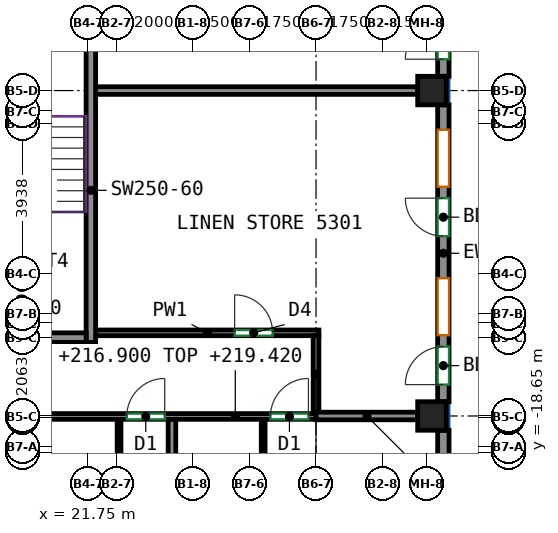
"""IFC4 building model, lengths in metres.
Left out: names, types, materials, properties, quantities, classifications, styles, units other than length and angle.
Written with IfcOpenShell. Run it as: python <this file> out.ifc"""

import sys

from ifc_helpers import new_model, si_unit, direction, frame, frame_2d, origin, origin_2d, place, context, subcontext, project, spatial, rectangle, extrude, source, transform, mapped, element, fill, save


model = new_model("IFC4")
c1 = context("Model", 3, precision=1e-05, world=origin(), true_north=direction((0.0, 1.0)))
c2 = subcontext(c1, "Body", "Model", "MODEL_VIEW")
j1 = project(units=[si_unit("LENGTHUNIT", "METRE"), si_unit("PLANEANGLEUNIT", "RADIAN")], contexts=[c1])
p1 = place(None, origin())
s1 = spatial("IfcSite", under=j1, at=p1, CompositionType="ELEMENT")
p2 = place(p1, origin())
s2 = spatial("IfcBuilding", under=s1, at=p2, CompositionType="ELEMENT")
p3 = place(p2, frame((0.0, 0.0, 216.9)))
s3 = spatial("IfcBuildingStorey", under=s2, at=p3, CompositionType="ELEMENT", Elevation=216.9)
m1 = source(origin(), c2, "Body", "SweptSolid", [
    extrude(rectangle(XDim=0.75, YDim=0.75, at=origin_2d()), origin(), (0.0, 0.0, 1.0), 3.12),
])
for number, where, z_axis, x_axis in (
    (1, (30.8, -17.688, 0.0), (0.0, 0.0, 1.0), (1.0, 0.0, 0.0)),
    (2, (30.8, -9.125, 0.0), (0.0, 0.0, 1.0), (1.0, 0.0, 0.0)),
):
    element("IfcColumn", number, at=place(p3, frame(where, z_axis=z_axis, x_axis=x_axis)), inside=s3, PredefinedType="COLUMN", context=c2, shape_type="MappedRepresentation", body=[
        mapped(m1, transform((0.0, 0.0, 0.0))),
    ])
m2 = source(origin(), c2, "Body", "SweptSolid", [
    extrude(rectangle(XDim=8.0, YDim=0.25, at=frame_2d((4.0, 0.0))), origin(), (0.0, 0.0, 1.0), 3.12),
])
p4 = place(p3, frame((21.825, -15.75, 0.0), z_axis=(0.0, 0.0, 1.0), x_axis=(0.0, 1.0, 0.0)))
e3 = element("IfcWall", 3, at=p4, inside=s3, PredefinedType="SHEAR", context=c2, shape_type="MappedRepresentation", body=[
    mapped(m2, transform((0.0, 0.0, 0.0))),
])
m3 = source(origin(), c2, "Body", "SweptSolid", [
    extrude(rectangle(XDim=3.7, YDim=0.25, at=frame_2d((1.85, 0.0))), origin(), (0.0, 0.0, 1.0), 3.12),
])
p5 = place(p3, frame((18.0, -15.625, 0.0), z_axis=(0.0, 0.0, 1.0), x_axis=(1.0, 0.0, 0.0)))
e4 = element("IfcWall", 4, at=p5, inside=s3, PredefinedType="SHEAR", context=c2, shape_type="MappedRepresentation", body=[
    mapped(m3, transform((0.0, 0.0, 0.0))),
])
m4 = source(origin(), c2, "Body", "SweptSolid", [
    extrude(rectangle(XDim=3.994, YDim=0.3, at=frame_2d((1.997, 0.0))), origin(), (0.0, 0.0, 1.0), 3.12),
])
p6 = place(p3, frame((31.1, -22.057, 0.0), z_axis=(0.0, 0.0, 1.0), x_axis=(0.0, 1.0, 0.0)))
e5 = element("IfcWall", 5, at=p6, inside=s3, PredefinedType="SOLIDWALL", context=c2, shape_type="MappedRepresentation", body=[
    mapped(m4, transform((0.0, 0.0, 0.0))),
])
p7 = place(p6, frame((1.75, 0.0, 0.85)))
e6 = element("IfcOpeningElement", 6, at=p7, cuts=e5, PredefinedType="OPENING", context=c2, shape_type="SweptSolid", body=[
    extrude(rectangle(XDim=1.5, YDim=1.95, at=frame_2d((0.75, 0.975))), frame((0.0, 0.16, 0.0), z_axis=(0.0, -1.0, 0.0), x_axis=(1.0, 0.0, 0.0)), (0.0, 0.0, 1.0), 0.32),
])
p8 = place(p6, frame((0.45, 0.0, 0.0)))
e7 = element("IfcOpeningElement", 7, at=p8, cuts=e5, PredefinedType="OPENING", context=c2, shape_type="SweptSolid", body=[
    extrude(rectangle(XDim=1.0, YDim=2.1, at=frame_2d((0.5, 1.05))), frame((0.0, 0.16, 0.0), z_axis=(0.0, -1.0, 0.0), x_axis=(1.0, 0.0, 0.0)), (0.0, 0.0, 1.0), 0.32),
])
m5 = source(origin(), c2, "Body", "SweptSolid", [
    extrude(rectangle(XDim=7.812, YDim=0.3, at=frame_2d((3.906, 0.0))), origin(), (0.0, 0.0, 1.0), 3.12),
])
p9 = place(p3, frame((31.1, -17.312, 0.0), z_axis=(0.0, 0.0, 1.0), x_axis=(0.0, 1.0, 0.0)))
e8 = element("IfcWall", 8, at=p9, inside=s3, PredefinedType="SOLIDWALL", context=c2, shape_type="MappedRepresentation", body=[
    mapped(m5, transform((0.0, 0.0, 0.0))),
])
p10 = place(p9, frame((1.75, 0.0, 0.85)))
e9 = element("IfcOpeningElement", 9, at=p10, cuts=e8, PredefinedType="OPENING", context=c2, shape_type="SweptSolid", body=[
    extrude(rectangle(XDim=1.5, YDim=1.95, at=frame_2d((0.75, 0.975))), frame((0.0, 0.16, 0.0), z_axis=(0.0, -1.0, 0.0), x_axis=(1.0, 0.0, 0.0)), (0.0, 0.0, 1.0), 0.32),
])
p11 = place(p9, frame((0.45, 0.0, 0.0)))
e10 = element("IfcOpeningElement", 10, at=p11, cuts=e8, PredefinedType="OPENING", context=c2, shape_type="SweptSolid", body=[
    extrude(rectangle(XDim=1.0, YDim=2.1, at=frame_2d((0.5, 1.05))), frame((0.0, 0.16, 0.0), z_axis=(0.0, -1.0, 0.0), x_axis=(1.0, 0.0, 0.0)), (0.0, 0.0, 1.0), 0.32),
])
p12 = place(p9, frame((5.656, 0.0, 0.85)))
e11 = element("IfcOpeningElement", 11, at=p12, cuts=e8, PredefinedType="OPENING", context=c2, shape_type="SweptSolid", body=[
    extrude(rectangle(XDim=1.5, YDim=1.95, at=frame_2d((0.75, 0.975))), frame((0.0, 0.16, 0.0), z_axis=(0.0, -1.0, 0.0), x_axis=(1.0, 0.0, 0.0)), (0.0, 0.0, 1.0), 0.32),
])
p13 = place(p9, frame((4.356, 0.0, 0.0)))
e12 = element("IfcOpeningElement", 12, at=p13, cuts=e8, PredefinedType="OPENING", context=c2, shape_type="SweptSolid", body=[
    extrude(rectangle(XDim=1.0, YDim=2.1, at=frame_2d((0.5, 1.05))), frame((0.0, 0.16, 0.0), z_axis=(0.0, -1.0, 0.0), x_axis=(1.0, 0.0, 0.0)), (0.0, 0.0, 1.0), 0.32),
])
p14 = place(p3, frame((31.1, -8.75, 0.0), z_axis=(0.0, 0.0, 1.0), x_axis=(0.0, 1.0, 0.0)))
e13 = element("IfcWall", 13, at=p14, inside=s3, PredefinedType="SOLIDWALL", context=c2, shape_type="MappedRepresentation", body=[
    mapped(m5, transform((0.0, 0.0, 0.0))),
])
p15 = place(p14, frame((1.75, 0.0, 0.85)))
e14 = element("IfcOpeningElement", 14, at=p15, cuts=e13, PredefinedType="OPENING", context=c2, shape_type="SweptSolid", body=[
    extrude(rectangle(XDim=1.5, YDim=1.95, at=frame_2d((0.75, 0.975))), frame((0.0, 0.16, 0.0), z_axis=(0.0, -1.0, 0.0), x_axis=(1.0, 0.0, 0.0)), (0.0, 0.0, 1.0), 0.32),
])
p16 = place(p14, frame((0.45, 0.0, 0.0)))
e15 = element("IfcOpeningElement", 15, at=p16, cuts=e13, PredefinedType="OPENING", context=c2, shape_type="SweptSolid", body=[
    extrude(rectangle(XDim=1.0, YDim=2.1, at=frame_2d((0.5, 1.05))), frame((0.0, 0.16, 0.0), z_axis=(0.0, -1.0, 0.0), x_axis=(1.0, 0.0, 0.0)), (0.0, 0.0, 1.0), 0.32),
])
p17 = place(p14, frame((5.656, 0.0, 0.85)))
e16 = element("IfcOpeningElement", 16, at=p17, cuts=e13, PredefinedType="OPENING", context=c2, shape_type="SweptSolid", body=[
    extrude(rectangle(XDim=1.5, YDim=1.95, at=frame_2d((0.75, 0.975))), frame((0.0, 0.16, 0.0), z_axis=(0.0, -1.0, 0.0), x_axis=(1.0, 0.0, 0.0)), (0.0, 0.0, 1.0), 0.32),
])
p18 = place(p3, frame((20.667, -17.7, 0.0), z_axis=(0.0, 0.0, 1.0), x_axis=(1.0, 0.0, 0.0)))
e17 = element("IfcWall", 17, at=p18, inside=s3, PredefinedType="PARTITIONING", context=c2, shape_type="SweptSolid", body=[
    extrude(rectangle(XDim=7.083, YDim=0.15, at=frame_2d((3.542, 0.0))), origin(), (0.0, 0.0, 1.0), 2.52),
])
p19 = place(p18, frame((2.102, 0.0, 0.0)))
e18 = element("IfcOpeningElement", 18, at=p19, cuts=e17, PredefinedType="OPENING", context=c2, shape_type="SweptSolid", body=[
    extrude(rectangle(XDim=1.0, YDim=2.1, at=frame_2d((0.5, 1.05))), frame((0.0, 0.085, 0.0), z_axis=(0.0, -1.0, 0.0), x_axis=(1.0, 0.0, 0.0)), (0.0, 0.0, 1.0), 0.17),
])
p20 = place(p18, frame((5.883, 0.0, 0.0)))
e19 = element("IfcOpeningElement", 19, at=p20, cuts=e17, PredefinedType="OPENING", context=c2, shape_type="SweptSolid", body=[
    extrude(rectangle(XDim=1.0, YDim=2.1, at=frame_2d((0.5, 1.05))), frame((0.0, 0.085, 0.0), z_axis=(0.0, -1.0, 0.0), x_axis=(1.0, 0.0, 0.0)), (0.0, 0.0, 1.0), 0.17),
])
p21 = place(p3, frame((21.95, -15.5, 0.0), z_axis=(0.0, 0.0, 1.0), x_axis=(1.0, 0.0, 0.0)))
e20 = element("IfcWall", 20, at=p21, inside=s3, PredefinedType="PARTITIONING", context=c2, shape_type="SweptSolid", body=[
    extrude(rectangle(XDim=5.875, YDim=0.15, at=frame_2d((2.938, 0.0))), origin(), (0.0, 0.0, 1.0), 3.12),
])
p22 = place(p21, frame((3.658, 0.0, 0.0)))
e21 = element("IfcOpeningElement", 21, at=p22, cuts=e20, PredefinedType="OPENING", context=c2, shape_type="SweptSolid", body=[
    extrude(rectangle(XDim=1.0, YDim=2.1, at=frame_2d((0.5, 1.05))), frame((0.0, 0.085, 0.0), z_axis=(0.0, -1.0, 0.0), x_axis=(1.0, 0.0, 0.0)), (0.0, 0.0, 1.0), 0.17),
])
p23 = place(p3, frame((27.75, -17.598, 0.0), z_axis=(0.0, 0.0, 1.0), x_axis=(0.0, 1.0, 0.0)))
e22 = element("IfcWall", 22, at=p23, inside=s3, PredefinedType="PARTITIONING", context=c2, shape_type="SweptSolid", body=[
    extrude(rectangle(XDim=2.023, YDim=0.15, at=frame_2d((1.011, 0.0))), origin(), (0.0, 0.0, 1.0), 2.52),
])
p24 = place(p3, frame((22.567, -17.777, 0.0), z_axis=(0.0, 0.0, 1.0), x_axis=(0.0, -1.0, 0.0)))
e23 = element("IfcWall", 23, at=p24, inside=s3, PredefinedType="PARTITIONING", context=c2, shape_type="SweptSolid", body=[
    extrude(rectangle(XDim=2.875, YDim=0.1, at=frame_2d((1.438, 0.0))), origin(), (0.0, 0.0, 1.0), 3.12),
])
p25 = place(p24, frame((1.67, 0.0, 0.0)))
e24 = element("IfcOpeningElement", 24, at=p25, cuts=e23, PredefinedType="OPENING", context=c2, shape_type="SweptSolid", body=[
    extrude(rectangle(XDim=0.9, YDim=2.1, at=frame_2d((0.45, 1.05))), frame((0.0, 0.06, 0.0), z_axis=(0.0, -1.0, 0.0), x_axis=(1.0, 0.0, 0.0)), (0.0, 0.0, 1.0), 0.12),
])
p26 = place(p3, frame((23.959, -20.648, 0.0), z_axis=(0.0, 0.0, 1.0), x_axis=(0.0, 1.0, 0.0)))
e25 = element("IfcWall", 25, at=p26, inside=s3, PredefinedType="PARTITIONING", context=c2, shape_type="SweptSolid", body=[
    extrude(rectangle(XDim=2.871, YDim=0.2, at=frame_2d((1.436, 0.0))), origin(), (0.0, 0.0, 1.0), 3.12),
])
p27 = place(p3, frame((26.359, -17.777, 0.0), z_axis=(0.0, 0.0, 1.0), x_axis=(0.0, -1.0, 0.0)))
e26 = element("IfcWall", 26, at=p27, inside=s3, PredefinedType="PARTITIONING", context=c2, shape_type="SweptSolid", body=[
    extrude(rectangle(XDim=2.861, YDim=0.1, at=frame_2d((1.43, 0.0))), origin(), (0.0, 0.0, 1.0), 3.12),
])
p28 = place(p27, frame((1.449, 0.0, 0.0)))
e27 = element("IfcOpeningElement", 27, at=p28, cuts=e26, PredefinedType="OPENING", context=c2, shape_type="SweptSolid", body=[
    extrude(rectangle(XDim=0.9, YDim=2.1, at=frame_2d((0.45, 1.05))), frame((0.0, 0.06, 0.0), z_axis=(0.0, -1.0, 0.0), x_axis=(1.0, 0.0, 0.0)), (0.0, 0.0, 1.0), 0.12),
])
p29 = place(p3, frame((27.752, -17.688, 0.0), z_axis=(0.0, 0.0, 1.0), x_axis=(1.0, 0.0, 0.0)))
e28 = element("IfcWall", 28, at=p29, inside=s3, PredefinedType="PARTITIONING", context=c2, shape_type="SweptSolid", body=[
    extrude(rectangle(XDim=2.673, YDim=0.2, at=frame_2d((1.336, 0.0))), origin(), (0.0, 0.0, 1.0), 2.52),
])
p30 = place(p3, frame((21.95, -9.125, 0.0), z_axis=(0.0, 0.0, 1.0), x_axis=(1.0, 0.0, 0.0)))
e29 = element("IfcWall", 29, at=p30, inside=s3, PredefinedType="PARTITIONING", context=c2, shape_type="SweptSolid", body=[
    extrude(rectangle(XDim=8.475, YDim=0.2, at=frame_2d((4.238, 0.0))), origin(), (0.0, 0.0, 1.0), 3.12),
])
p31 = place(p10, origin())
e30 = element("IfcWindow", 30, at=p31, inside=s3, PartitioningType="SINGLE_PANEL", PredefinedType="WINDOW", context=c2, shape_type="SweptSolid", body=[
    extrude(rectangle(XDim=1.5, YDim=1.95, at=frame_2d((0.75, 0.975))), frame((0.0, 0.03, 0.0), z_axis=(0.0, -1.0, 0.0), x_axis=(1.0, 0.0, 0.0)), (0.0, 0.0, 1.0), 0.06),
])
fill(e9, e30)
p32 = place(p11, origin())
e31 = element("IfcDoor", 31, at=p32, inside=s3, OperationType="SINGLE_SWING_LEFT", PredefinedType="DOOR", context=c2, shape_type="SweptSolid", body=[
    extrude(rectangle(XDim=1.0, YDim=2.1, at=frame_2d((0.5, 1.05))), frame((0.0, 0.025, 0.0), z_axis=(0.0, -1.0, 0.0), x_axis=(1.0, 0.0, 0.0)), (0.0, 0.0, 1.0), 0.05),
])
fill(e10, e31)
p33 = place(p12, origin())
e32 = element("IfcWindow", 32, at=p33, inside=s3, PartitioningType="SINGLE_PANEL", PredefinedType="WINDOW", context=c2, shape_type="SweptSolid", body=[
    extrude(rectangle(XDim=1.5, YDim=1.95, at=frame_2d((0.75, 0.975))), frame((0.0, 0.03, 0.0), z_axis=(0.0, -1.0, 0.0), x_axis=(1.0, 0.0, 0.0)), (0.0, 0.0, 1.0), 0.06),
])
fill(e11, e32)
p34 = place(p13, origin())
e33 = element("IfcDoor", 33, at=p34, inside=s3, OperationType="SINGLE_SWING_RIGHT", PredefinedType="DOOR", context=c2, shape_type="SweptSolid", body=[
    extrude(rectangle(XDim=1.0, YDim=2.1, at=frame_2d((0.5, 1.05))), frame((0.0, 0.025, 0.0), z_axis=(0.0, -1.0, 0.0), x_axis=(1.0, 0.0, 0.0)), (0.0, 0.0, 1.0), 0.05),
])
fill(e12, e33)
p35 = place(p16, origin())
e34 = element("IfcDoor", 34, at=p35, inside=s3, OperationType="SINGLE_SWING_LEFT", PredefinedType="DOOR", context=c2, shape_type="SweptSolid", body=[
    extrude(rectangle(XDim=1.0, YDim=2.1, at=frame_2d((0.5, 1.05))), frame((0.0, 0.025, 0.0), z_axis=(0.0, -1.0, 0.0), x_axis=(1.0, 0.0, 0.0)), (0.0, 0.0, 1.0), 0.05),
])
fill(e15, e34)
p36 = place(p19, origin())
e35 = element("IfcDoor", 35, at=p36, inside=s3, OperationType="SINGLE_SWING_RIGHT", PredefinedType="DOOR", context=c2, shape_type="SweptSolid", body=[
    extrude(rectangle(XDim=1.0, YDim=2.1, at=frame_2d((0.5, 1.05))), frame((0.0, 0.025, 0.0), z_axis=(0.0, -1.0, 0.0), x_axis=(1.0, 0.0, 0.0)), (0.0, 0.0, 1.0), 0.05),
])
fill(e18, e35)
p37 = place(p20, origin())
e36 = element("IfcDoor", 36, at=p37, inside=s3, OperationType="SINGLE_SWING_RIGHT", PredefinedType="DOOR", context=c2, shape_type="SweptSolid", body=[
    extrude(rectangle(XDim=1.0, YDim=2.1, at=frame_2d((0.5, 1.05))), frame((0.0, 0.025, 0.0), z_axis=(0.0, -1.0, 0.0), x_axis=(1.0, 0.0, 0.0)), (0.0, 0.0, 1.0), 0.05),
])
fill(e19, e36)
p38 = place(p22, origin())
e37 = element("IfcDoor", 37, at=p38, inside=s3, OperationType="SINGLE_SWING_LEFT", PredefinedType="DOOR", context=c2, shape_type="SweptSolid", body=[
    extrude(rectangle(XDim=1.0, YDim=2.1, at=frame_2d((0.5, 1.05))), frame((0.0, 0.025, 0.0), z_axis=(0.0, -1.0, 0.0), x_axis=(1.0, 0.0, 0.0)), (0.0, 0.0, 1.0), 0.05),
])
fill(e21, e37)
save(model, sys.argv[1])
